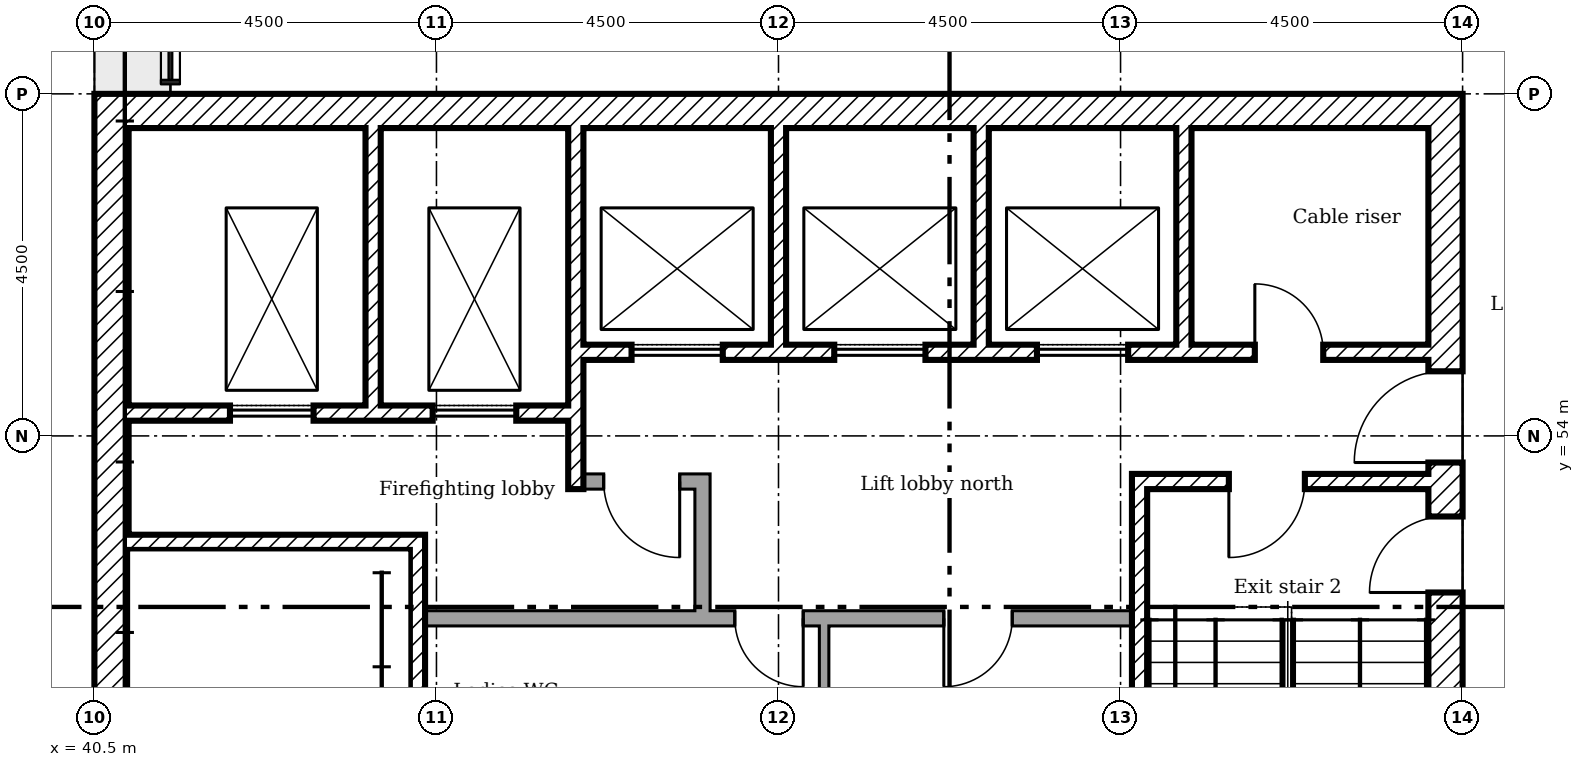
"""IFC4 building model, lengths in metres.
Left out: names, types, materials, properties, quantities, classifications, styles, units other than length and angle.
Written with IfcOpenShell. Run it as: python <this file> out.ifc"""

import sys

from ifc_helpers import new_model, si_unit, direction, frame, frame_2d, origin, place, context, subcontext, project, spatial, rectangle, extrude, element, fill, save


model = new_model("IFC4")
c1 = context("Model", 3, precision=1e-05, world=origin(), true_north=direction((0.0, 1.0)))
c2 = subcontext(c1, "Body", "Model", "MODEL_VIEW")
j1 = project(units=[si_unit("LENGTHUNIT", "METRE"), si_unit("PLANEANGLEUNIT", "RADIAN")], contexts=[c1])
p1 = place(None, origin())
s1 = spatial("IfcSite", under=j1, at=p1, CompositionType="ELEMENT")
p2 = place(p1, origin())
s2 = spatial("IfcBuilding", under=s1, at=p2, CompositionType="ELEMENT")
p3 = place(p2, frame((0.0, 0.0, 259.4)))
s3 = spatial("IfcBuildingStorey", under=s2, at=p3, CompositionType="ELEMENT", Elevation=259.4)
p4 = place(p3, frame((58.275, 40.5, 0.0), z_axis=(0.0, 0.0, 1.0), x_axis=(0.0, 1.0, 0.0)))
e1 = element("IfcWall", 1, at=p4, inside=s3, PredefinedType="SHEAR", context=c2, shape_type="SweptSolid", body=[
    extrude(rectangle(XDim=18.0, YDim=0.45, at=frame_2d((9.0, 0.0))), origin(), (0.0, 0.0, 1.0), 3.925),
])
p5 = place(p4, frame((13.15, 0.0, 0.0)))
e2 = element("IfcOpeningElement", 2, at=p5, cuts=e1, PredefinedType="OPENING", context=c2, shape_type="SweptSolid", body=[
    extrude(rectangle(XDim=1.2, YDim=2.1, at=frame_2d((0.6, 1.05))), frame((0.0, 0.235, 0.0), z_axis=(0.0, -1.0, 0.0), x_axis=(1.0, 0.0, 0.0)), (0.0, 0.0, 1.0), 0.47),
])
p6 = place(p4, frame((3.9, 0.0, 0.0)))
e3 = element("IfcOpeningElement", 3, at=p6, cuts=e1, PredefinedType="OPENING", context=c2, shape_type="SweptSolid", body=[
    extrude(rectangle(XDim=1.8, YDim=2.1, at=frame_2d((0.9, 1.05))), frame((0.0, 0.235, 0.0), z_axis=(0.0, -1.0, 0.0), x_axis=(1.0, 0.0, 0.0)), (0.0, 0.0, 1.0), 0.47),
])
p7 = place(p4, frame((11.44, 0.0, 0.0)))
e4 = element("IfcOpeningElement", 4, at=p7, cuts=e1, PredefinedType="OPENING", context=c2, shape_type="SweptSolid", body=[
    extrude(rectangle(XDim=1.0, YDim=2.1, at=frame_2d((0.5, 1.05))), frame((0.0, 0.235, 0.0), z_axis=(0.0, -1.0, 0.0), x_axis=(1.0, 0.0, 0.0)), (0.0, 0.0, 1.0), 0.47),
])
p8 = place(p3, frame((40.5, 58.275, 0.0)))
e5 = element("IfcWall", 5, at=p8, inside=s3, PredefinedType="SHEAR", context=c2, shape_type="SweptSolid", body=[
    extrude(rectangle(XDim=17.55, YDim=0.45, at=frame_2d((8.775, 0.0))), origin(), (0.0, 0.0, 1.0), 3.925),
])
p9 = place(p3, frame((40.725, 40.95, 0.0), z_axis=(0.0, 0.0, 1.0), x_axis=(0.0, 1.0, 0.0)))
e6 = element("IfcWall", 6, at=p9, inside=s3, PredefinedType="SHEAR", context=c2, shape_type="SweptSolid", body=[
    extrude(rectangle(XDim=17.1, YDim=0.45, at=frame_2d((8.55, 0.0))), origin(), (0.0, 0.0, 1.0), 3.925),
])
p10 = place(p3, frame((44.167, 58.05, 0.0), z_axis=(0.0, 0.0, 1.0), x_axis=(0.0, -1.0, 0.0)))
e7 = element("IfcWall", 7, at=p10, inside=s3, PredefinedType="SHEAR", context=c2, shape_type="SweptSolid", body=[
    extrude(rectangle(XDim=3.65, YDim=0.2, at=frame_2d((1.825, 0.0))), origin(), (0.0, 0.0, 1.0), 3.925),
])
p11 = place(p3, frame((46.833, 58.05, 0.0), z_axis=(0.0, 0.0, 1.0), x_axis=(0.0, -1.0, 0.0)))
e8 = element("IfcWall", 8, at=p11, inside=s3, PredefinedType="SHEAR", context=c2, shape_type="SweptSolid", body=[
    extrude(rectangle(XDim=4.75, YDim=0.2, at=frame_2d((2.375, 0.0))), origin(), (0.0, 0.0, 1.0), 3.925),
])
for number, where, z_axis, x_axis in (
    (9, (49.5, 58.05, 0.0), (0.0, 0.0, 1.0), (0.0, -1.0, 0.0)),
    (10, (52.167, 58.05, 0.0), (0.0, 0.0, 1.0), (0.0, -1.0, 0.0)),
    (11, (54.833, 58.05, 0.0), (0.0, 0.0, 1.0), (0.0, -1.0, 0.0)),
):
    element("IfcWall", number, at=place(p3, frame(where, z_axis=z_axis, x_axis=x_axis)), inside=s3, PredefinedType="SHEAR", context=c2, shape_type="SweptSolid", body=[
        extrude(rectangle(XDim=2.85, YDim=0.2, at=frame_2d((1.425, 0.0))), origin(), (0.0, 0.0, 1.0), 3.925),
    ])
p12 = place(p3, frame((48.5, 51.6, 0.0), z_axis=(0.0, 0.0, 1.0), x_axis=(0.0, 1.0, 0.0)))
e12 = element("IfcWall", 12, at=p12, inside=s3, PredefinedType="PARTITIONING", context=c2, shape_type="SweptSolid", body=[
    extrude(rectangle(XDim=1.9, YDim=0.2, at=frame_2d((0.95, 0.0))), origin(), (0.0, 0.0, 1.0), 3.925),
])
p13 = place(p3, frame((46.933, 53.4, 0.0)))
e13 = element("IfcWall", 13, at=p13, inside=s3, PredefinedType="PARTITIONING", context=c2, shape_type="SweptSolid", body=[
    extrude(rectangle(XDim=1.467, YDim=0.2, at=frame_2d((0.733, 0.0))), origin(), (0.0, 0.0, 1.0), 3.925),
])
p14 = place(p13, frame((0.267, 0.0, 0.0)))
e14 = element("IfcOpeningElement", 14, at=p14, cuts=e13, PredefinedType="OPENING", context=c2, shape_type="SweptSolid", body=[
    extrude(rectangle(XDim=1.0, YDim=2.1, at=frame_2d((0.5, 1.05))), frame((0.0, 0.11, 0.0), z_axis=(0.0, -1.0, 0.0), x_axis=(1.0, 0.0, 0.0)), (0.0, 0.0, 1.0), 0.22),
])
p15 = place(p3, frame((46.933, 55.1, 0.0)))
e15 = element("IfcWall", 15, at=p15, inside=s3, PredefinedType="SHEAR", context=c2, shape_type="SweptSolid", body=[
    extrude(rectangle(XDim=11.117, YDim=0.2, at=frame_2d((5.558, 0.0))), origin(), (0.0, 0.0, 1.0), 3.925),
])
p16 = place(p15, frame((8.833, 0.0, 0.0)))
e16 = element("IfcOpeningElement", 16, at=p16, cuts=e15, PredefinedType="OPENING", context=c2, shape_type="SweptSolid", body=[
    extrude(rectangle(XDim=0.9, YDim=2.1, at=frame_2d((0.45, 1.05))), frame((0.0, 0.11, 0.0), z_axis=(0.0, -1.0, 0.0), x_axis=(1.0, 0.0, 0.0)), (0.0, 0.0, 1.0), 0.22),
])
p17 = place(p15, frame((0.633, 0.0, 0.0)))
e17 = element("IfcOpeningElement", 17, at=p17, cuts=e15, PredefinedType="OPENING", context=c2, shape_type="SweptSolid", body=[
    extrude(rectangle(XDim=1.2, YDim=2.1, at=frame_2d((0.6, 1.05))), frame((0.0, 0.11, 0.0), z_axis=(0.0, -1.0, 0.0), x_axis=(1.0, 0.0, 0.0)), (0.0, 0.0, 1.0), 0.22),
])
p18 = place(p15, frame((3.3, 0.0, 0.0)))
e18 = element("IfcOpeningElement", 18, at=p18, cuts=e15, PredefinedType="OPENING", context=c2, shape_type="SweptSolid", body=[
    extrude(rectangle(XDim=1.2, YDim=2.1, at=frame_2d((0.6, 1.05))), frame((0.0, 0.11, 0.0), z_axis=(0.0, -1.0, 0.0), x_axis=(1.0, 0.0, 0.0)), (0.0, 0.0, 1.0), 0.22),
])
p19 = place(p15, frame((5.967, 0.0, 0.0)))
e19 = element("IfcOpeningElement", 19, at=p19, cuts=e15, PredefinedType="OPENING", context=c2, shape_type="SweptSolid", body=[
    extrude(rectangle(XDim=1.2, YDim=2.1, at=frame_2d((0.6, 1.05))), frame((0.0, 0.11, 0.0), z_axis=(0.0, -1.0, 0.0), x_axis=(1.0, 0.0, 0.0)), (0.0, 0.0, 1.0), 0.22),
])
p20 = place(p3, frame((40.95, 54.3, 0.0)))
e20 = element("IfcWall", 20, at=p20, inside=s3, PredefinedType="SHEAR", context=c2, shape_type="SweptSolid", body=[
    extrude(rectangle(XDim=5.783, YDim=0.2, at=frame_2d((2.892, 0.0))), origin(), (0.0, 0.0, 1.0), 3.925),
])
p21 = place(p20, frame((1.333, 0.0, 0.0)))
e21 = element("IfcOpeningElement", 21, at=p21, cuts=e20, PredefinedType="OPENING", context=c2, shape_type="SweptSolid", body=[
    extrude(rectangle(XDim=1.1, YDim=2.1, at=frame_2d((0.55, 1.05))), frame((0.0, 0.11, 0.0), z_axis=(0.0, -1.0, 0.0), x_axis=(1.0, 0.0, 0.0)), (0.0, 0.0, 1.0), 0.22),
])
p22 = place(p20, frame((4.0, 0.0, 0.0)))
e22 = element("IfcOpeningElement", 22, at=p22, cuts=e20, PredefinedType="OPENING", context=c2, shape_type="SweptSolid", body=[
    extrude(rectangle(XDim=1.1, YDim=2.1, at=frame_2d((0.55, 1.05))), frame((0.0, 0.11, 0.0), z_axis=(0.0, -1.0, 0.0), x_axis=(1.0, 0.0, 0.0)), (0.0, 0.0, 1.0), 0.22),
])
p23 = place(p3, frame((44.75, 45.5, 0.0), z_axis=(0.0, 0.0, 1.0), x_axis=(0.0, 1.0, 0.0)))
e23 = element("IfcWall", 23, at=p23, inside=s3, PredefinedType="SHEAR", context=c2, shape_type="SweptSolid", body=[
    extrude(rectangle(XDim=7.2, YDim=0.2, at=frame_2d((3.6, 0.0))), origin(), (0.0, 0.0, 1.0), 3.925),
])
p24 = place(p3, frame((40.95, 52.6, 0.0)))
e24 = element("IfcWall", 24, at=p24, inside=s3, PredefinedType="SHEAR", context=c2, shape_type="SweptSolid", body=[
    extrude(rectangle(XDim=3.7, YDim=0.2, at=frame_2d((1.85, 0.0))), origin(), (0.0, 0.0, 1.0), 3.925),
])
p25 = place(p3, frame((54.15, 53.4, 0.0)))
e25 = element("IfcWall", 25, at=p25, inside=s3, PredefinedType="SHEAR", context=c2, shape_type="SweptSolid", body=[
    extrude(rectangle(XDim=3.9, YDim=0.2, at=frame_2d((1.95, 0.0))), origin(), (0.0, 0.0, 1.0), 3.925),
])
p26 = place(p25, frame((1.275, 0.0, 0.0)))
e26 = element("IfcOpeningElement", 26, at=p26, cuts=e25, PredefinedType="OPENING", context=c2, shape_type="SweptSolid", body=[
    extrude(rectangle(XDim=1.0, YDim=2.1, at=frame_2d((0.5, 1.05))), frame((0.0, 0.11, 0.0), z_axis=(0.0, -1.0, 0.0), x_axis=(1.0, 0.0, 0.0)), (0.0, 0.0, 1.0), 0.22),
])
p27 = place(p3, frame((54.25, 46.5, 0.0), z_axis=(0.0, 0.0, 1.0), x_axis=(0.0, 1.0, 0.0)))
e27 = element("IfcWall", 27, at=p27, inside=s3, PredefinedType="SHEAR", context=c2, shape_type="SweptSolid", body=[
    extrude(rectangle(XDim=6.8, YDim=0.2, at=frame_2d((3.4, 0.0))), origin(), (0.0, 0.0, 1.0), 3.925),
])
p28 = place(p3, frame((44.85, 51.6, 0.0)))
e28 = element("IfcWall", 28, at=p28, inside=s3, PredefinedType="PARTITIONING", context=c2, shape_type="SweptSolid", body=[
    extrude(rectangle(XDim=9.3, YDim=0.2, at=frame_2d((4.65, 0.0))), origin(), (0.0, 0.0, 1.0), 3.925),
])
p29 = place(p28, frame((4.075, 0.0, 0.0)))
e29 = element("IfcOpeningElement", 29, at=p29, cuts=e28, PredefinedType="OPENING", context=c2, shape_type="SweptSolid", body=[
    extrude(rectangle(XDim=0.9, YDim=2.1, at=frame_2d((0.45, 1.05))), frame((0.0, 0.11, 0.0), z_axis=(0.0, -1.0, 0.0), x_axis=(1.0, 0.0, 0.0)), (0.0, 0.0, 1.0), 0.22),
])
p30 = place(p28, frame((6.825, 0.0, 0.0)))
e30 = element("IfcOpeningElement", 30, at=p30, cuts=e28, PredefinedType="OPENING", context=c2, shape_type="SweptSolid", body=[
    extrude(rectangle(XDim=0.9, YDim=2.1, at=frame_2d((0.45, 1.05))), frame((0.0, 0.11, 0.0), z_axis=(0.0, -1.0, 0.0), x_axis=(1.0, 0.0, 0.0)), (0.0, 0.0, 1.0), 0.22),
])
p31 = place(p3, frame((50.1, 49.9, 0.0), z_axis=(0.0, 0.0, 1.0), x_axis=(0.0, 1.0, 0.0)))
e31 = element("IfcWall", 31, at=p31, inside=s3, PredefinedType="PARTITIONING", context=c2, shape_type="SweptSolid", body=[
    extrude(rectangle(XDim=1.6, YDim=0.125, at=frame_2d((0.8, 0.0))), origin(), (0.0, 0.0, 1.0), 3.925),
])
p32 = place(p5, origin())
e32 = element("IfcDoor", 32, at=p32, inside=s3, OperationType="SINGLE_SWING_RIGHT", PredefinedType="DOOR", context=c2, shape_type="SweptSolid", body=[
    extrude(rectangle(XDim=1.2, YDim=2.1, at=frame_2d((0.6, 1.05))), frame((0.0, 0.025, 0.0), z_axis=(0.0, -1.0, 0.0), x_axis=(1.0, 0.0, 0.0)), (0.0, 0.0, 1.0), 0.05),
])
fill(e2, e32)
p33 = place(p26, frame((1.0, 0.0, 0.0), x_axis=(-1.0, 0.0, 0.0)))
e33 = element("IfcDoor", 33, at=p33, inside=s3, OperationType="SINGLE_SWING_LEFT", PredefinedType="DOOR", context=c2, shape_type="SweptSolid", body=[
    extrude(rectangle(XDim=1.0, YDim=2.1, at=frame_2d((0.5, 1.05))), frame((0.0, 0.025, 0.0), z_axis=(0.0, -1.0, 0.0), x_axis=(1.0, 0.0, 0.0)), (0.0, 0.0, 1.0), 0.05),
])
fill(e26, e33)
p34 = place(p7, origin())
e34 = element("IfcDoor", 34, at=p34, inside=s3, OperationType="SINGLE_SWING_RIGHT", PredefinedType="DOOR", context=c2, shape_type="SweptSolid", body=[
    extrude(rectangle(XDim=1.0, YDim=2.1, at=frame_2d((0.5, 1.05))), frame((0.0, 0.025, 0.0), z_axis=(0.0, -1.0, 0.0), x_axis=(1.0, 0.0, 0.0)), (0.0, 0.0, 1.0), 0.05),
])
fill(e4, e34)
p35 = place(p14, frame((1.0, 0.0, 0.0), x_axis=(-1.0, 0.0, 0.0)))
e35 = element("IfcDoor", 35, at=p35, inside=s3, OperationType="SINGLE_SWING_RIGHT", PredefinedType="DOOR", context=c2, shape_type="SweptSolid", body=[
    extrude(rectangle(XDim=1.0, YDim=2.1, at=frame_2d((0.5, 1.05))), frame((0.0, 0.025, 0.0), z_axis=(0.0, -1.0, 0.0), x_axis=(1.0, 0.0, 0.0)), (0.0, 0.0, 1.0), 0.05),
])
fill(e14, e35)
p36 = place(p16, origin())
e36 = element("IfcDoor", 36, at=p36, inside=s3, OperationType="SINGLE_SWING_RIGHT", PredefinedType="DOOR", context=c2, shape_type="SweptSolid", body=[
    extrude(rectangle(XDim=0.9, YDim=2.1, at=frame_2d((0.45, 1.05))), frame((0.0, 0.025, 0.0), z_axis=(0.0, -1.0, 0.0), x_axis=(1.0, 0.0, 0.0)), (0.0, 0.0, 1.0), 0.05),
])
fill(e16, e36)
p37 = place(p29, frame((0.9, 0.0, 0.0), x_axis=(-1.0, 0.0, 0.0)))
e37 = element("IfcDoor", 37, at=p37, inside=s3, OperationType="SINGLE_SWING_RIGHT", PredefinedType="DOOR", context=c2, shape_type="SweptSolid", body=[
    extrude(rectangle(XDim=0.9, YDim=2.1, at=frame_2d((0.45, 1.05))), frame((0.0, 0.025, 0.0), z_axis=(0.0, -1.0, 0.0), x_axis=(1.0, 0.0, 0.0)), (0.0, 0.0, 1.0), 0.05),
])
fill(e29, e37)
p38 = place(p30, frame((0.9, 0.0, 0.0), x_axis=(-1.0, 0.0, 0.0)))
e38 = element("IfcDoor", 38, at=p38, inside=s3, OperationType="SINGLE_SWING_LEFT", PredefinedType="DOOR", context=c2, shape_type="SweptSolid", body=[
    extrude(rectangle(XDim=0.9, YDim=2.1, at=frame_2d((0.45, 1.05))), frame((0.0, 0.025, 0.0), z_axis=(0.0, -1.0, 0.0), x_axis=(1.0, 0.0, 0.0)), (0.0, 0.0, 1.0), 0.05),
])
fill(e30, e38)
p39 = place(p21, origin())
e39 = element("IfcDoor", 39, at=p39, inside=s3, OperationType="SLIDING_TO_LEFT", PredefinedType="DOOR", context=c2, shape_type="SweptSolid", body=[
    extrude(rectangle(XDim=1.1, YDim=2.1, at=frame_2d((0.55, 1.05))), frame((0.0, 0.025, 0.0), z_axis=(0.0, -1.0, 0.0), x_axis=(1.0, 0.0, 0.0)), (0.0, 0.0, 1.0), 0.05),
])
fill(e21, e39)
p40 = place(p22, origin())
e40 = element("IfcDoor", 40, at=p40, inside=s3, OperationType="SLIDING_TO_LEFT", PredefinedType="DOOR", context=c2, shape_type="SweptSolid", body=[
    extrude(rectangle(XDim=1.1, YDim=2.1, at=frame_2d((0.55, 1.05))), frame((0.0, 0.025, 0.0), z_axis=(0.0, -1.0, 0.0), x_axis=(1.0, 0.0, 0.0)), (0.0, 0.0, 1.0), 0.05),
])
fill(e22, e40)
p41 = place(p17, origin())
e41 = element("IfcDoor", 41, at=p41, inside=s3, OperationType="SLIDING_TO_LEFT", PredefinedType="DOOR", context=c2, shape_type="SweptSolid", body=[
    extrude(rectangle(XDim=1.2, YDim=2.1, at=frame_2d((0.6, 1.05))), frame((0.0, 0.025, 0.0), z_axis=(0.0, -1.0, 0.0), x_axis=(1.0, 0.0, 0.0)), (0.0, 0.0, 1.0), 0.05),
])
fill(e17, e41)
p42 = place(p18, origin())
e42 = element("IfcDoor", 42, at=p42, inside=s3, OperationType="SLIDING_TO_LEFT", PredefinedType="DOOR", context=c2, shape_type="SweptSolid", body=[
    extrude(rectangle(XDim=1.2, YDim=2.1, at=frame_2d((0.6, 1.05))), frame((0.0, 0.025, 0.0), z_axis=(0.0, -1.0, 0.0), x_axis=(1.0, 0.0, 0.0)), (0.0, 0.0, 1.0), 0.05),
])
fill(e18, e42)
p43 = place(p19, origin())
e43 = element("IfcDoor", 43, at=p43, inside=s3, OperationType="SLIDING_TO_LEFT", PredefinedType="DOOR", context=c2, shape_type="SweptSolid", body=[
    extrude(rectangle(XDim=1.2, YDim=2.1, at=frame_2d((0.6, 1.05))), frame((0.0, 0.025, 0.0), z_axis=(0.0, -1.0, 0.0), x_axis=(1.0, 0.0, 0.0)), (0.0, 0.0, 1.0), 0.05),
])
fill(e19, e43)
save(model, sys.argv[1])
